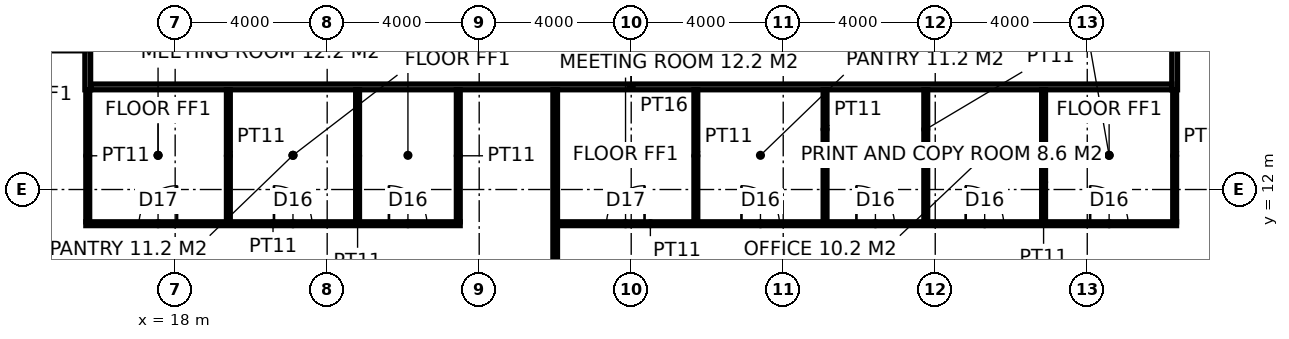
"""IFC4 building model, lengths in metres.
Left out: names, types, materials, properties, quantities, classifications, styles, units other than length and angle.
Written with IfcOpenShell. Run it as: python <this file> out.ifc"""

import sys

from ifc_helpers import new_model, si_unit, direction, frame, frame_2d, origin, place, context, subcontext, project, spatial, rectangle, extrude, element, fill, save


model = new_model("IFC4")
c1 = context("Model", 3, precision=1e-05, world=origin(), true_north=direction((0.0, 1.0)))
c2 = subcontext(c1, "Body", "Model", "MODEL_VIEW")
j1 = project(units=[si_unit("LENGTHUNIT", "METRE"), si_unit("PLANEANGLEUNIT", "RADIAN")], contexts=[c1])
p1 = place(None, origin())
s1 = spatial("IfcSite", under=j1, at=p1, CompositionType="ELEMENT")
p2 = place(p1, origin())
s2 = spatial("IfcBuilding", under=s1, at=p2, CompositionType="ELEMENT")
p3 = place(p2, frame((0.0, 0.0, 67.0)))
s3 = spatial("IfcBuildingStorey", under=s2, at=p3, CompositionType="ELEMENT", Elevation=67.0)
p4 = place(p3, frame((15.7, 14.625, 0.0), z_axis=(0.0, 0.0, 1.0), x_axis=(0.0, 1.0, 0.0)))
e1 = element("IfcWall", 1, at=p4, inside=s3, PredefinedType="PARTITIONING", context=c2, shape_type="SweptSolid", body=[
    extrude(rectangle(XDim=24.15, YDim=0.15, at=frame_2d((12.075, 0.0))), origin(), (0.0, 0.0, 1.0), 3.85),
])
p5 = place(p4, frame((7.475, 0.0, 0.0)))
e2 = element("IfcOpeningElement", 2, at=p5, cuts=e1, PredefinedType="OPENING", context=c2, shape_type="SweptSolid", body=[
    extrude(rectangle(XDim=1.8, YDim=2.4, at=frame_2d((0.9, 1.2))), frame((0.0, 0.085, 0.0), z_axis=(0.0, -1.0, 0.0), x_axis=(1.0, 0.0, 0.0)), (0.0, 0.0, 1.0), 0.17),
])
p6 = place(p4, frame((19.425, 0.0, 0.0)))
e3 = element("IfcOpeningElement", 3, at=p6, cuts=e1, PredefinedType="OPENING", context=c2, shape_type="SweptSolid", body=[
    extrude(rectangle(XDim=1.8, YDim=2.4, at=frame_2d((0.9, 1.2))), frame((0.0, 0.085, 0.0), z_axis=(0.0, -1.0, 0.0), x_axis=(1.0, 0.0, 0.0)), (0.0, 0.0, 1.0), 0.17),
])
p7 = place(p3, frame((44.3, 14.625, 0.0), z_axis=(0.0, 0.0, 1.0), x_axis=(0.0, 1.0, 0.0)))
e4 = element("IfcWall", 4, at=p7, inside=s3, PredefinedType="PARTITIONING", context=c2, shape_type="SweptSolid", body=[
    extrude(rectangle(XDim=24.15, YDim=0.15, at=frame_2d((12.075, 0.0))), origin(), (0.0, 0.0, 1.0), 3.85),
])
p8 = place(p7, frame((2.825, 0.0, 0.0)))
e5 = element("IfcOpeningElement", 5, at=p8, cuts=e4, PredefinedType="OPENING", context=c2, shape_type="SweptSolid", body=[
    extrude(rectangle(XDim=1.8, YDim=2.4, at=frame_2d((0.9, 1.2))), frame((0.0, 0.085, 0.0), z_axis=(0.0, -1.0, 0.0), x_axis=(1.0, 0.0, 0.0)), (0.0, 0.0, 1.0), 0.17),
])
p9 = place(p7, frame((15.425, 0.0, 0.0)))
e6 = element("IfcOpeningElement", 6, at=p9, cuts=e4, PredefinedType="OPENING", context=c2, shape_type="SweptSolid", body=[
    extrude(rectangle(XDim=1.8, YDim=2.4, at=frame_2d((0.9, 1.2))), frame((0.0, 0.085, 0.0), z_axis=(0.0, -1.0, 0.0), x_axis=(1.0, 0.0, 0.0)), (0.0, 0.0, 1.0), 0.17),
])
p10 = place(p3, frame((15.775, 14.7, 0.0), z_axis=(0.0, 0.0, 1.0), x_axis=(1.0, 0.0, 0.0)))
e7 = element("IfcWall", 7, at=p10, inside=s3, PredefinedType="PARTITIONING", context=c2, shape_type="SweptSolid", body=[
    extrude(rectangle(XDim=28.45, YDim=0.15, at=frame_2d((14.225, 0.0))), origin(), (0.0, 0.0, 1.0), 3.85),
])
p11 = place(p3, frame((28.0, 0.3, 0.0), z_axis=(0.0, 0.0, 1.0), x_axis=(0.0, 1.0, 0.0)))
e8 = element("IfcWall", 8, at=p11, inside=s3, PredefinedType="PARTITIONING", context=c2, shape_type="SweptSolid", body=[
    extrude(rectangle(XDim=14.325, YDim=0.12, at=frame_2d((7.163, 0.0))), origin(), (0.0, 0.0, 1.0), 3.85),
])
p12 = place(p3, frame((15.65, 11.1, 0.0), z_axis=(0.0, 0.0, 1.0), x_axis=(1.0, 0.0, 0.0)))
e9 = element("IfcWall", 9, at=p12, inside=s3, PredefinedType="PARTITIONING", context=c2, shape_type="SweptSolid", body=[
    extrude(rectangle(XDim=9.85, YDim=0.1, at=frame_2d((4.925, 0.0))), origin(), (0.0, 0.0, 1.0), 3.85),
])
p13 = place(p12, frame((1.4, 0.0, 0.0)))
e10 = element("IfcOpeningElement", 10, at=p13, cuts=e9, PredefinedType="OPENING", context=c2, shape_type="SweptSolid", body=[
    extrude(rectangle(XDim=1.0, YDim=2.2, at=frame_2d((0.5, 1.1))), frame((0.0, 0.06, 0.0), z_axis=(0.0, -1.0, 0.0), x_axis=(1.0, 0.0, 0.0)), (0.0, 0.0, 1.0), 0.12),
])
p14 = place(p12, frame((4.95, 0.0, 0.0)))
e11 = element("IfcOpeningElement", 11, at=p14, cuts=e9, PredefinedType="OPENING", context=c2, shape_type="SweptSolid", body=[
    extrude(rectangle(XDim=1.0, YDim=2.2, at=frame_2d((0.5, 1.1))), frame((0.0, 0.06, 0.0), z_axis=(0.0, -1.0, 0.0), x_axis=(1.0, 0.0, 0.0)), (0.0, 0.0, 1.0), 0.12),
])
p15 = place(p12, frame((7.975, 0.0, 0.0)))
e12 = element("IfcOpeningElement", 12, at=p15, cuts=e9, PredefinedType="OPENING", context=c2, shape_type="SweptSolid", body=[
    extrude(rectangle(XDim=1.0, YDim=2.2, at=frame_2d((0.5, 1.1))), frame((0.0, 0.06, 0.0), z_axis=(0.0, -1.0, 0.0), x_axis=(1.0, 0.0, 0.0)), (0.0, 0.0, 1.0), 0.12),
])
p16 = place(p3, frame((28.061, 11.1, 0.0), z_axis=(0.0, 0.0, 1.0), x_axis=(1.0, 0.0, 0.0)))
e13 = element("IfcWall", 13, at=p16, inside=s3, PredefinedType="PARTITIONING", context=c2, shape_type="SweptSolid", body=[
    extrude(rectangle(XDim=16.289, YDim=0.1, at=frame_2d((8.145, 0.0))), origin(), (0.0, 0.0, 1.0), 3.85),
])
p17 = place(p16, frame((1.29, 0.0, 0.0)))
e14 = element("IfcOpeningElement", 14, at=p17, cuts=e13, PredefinedType="OPENING", context=c2, shape_type="SweptSolid", body=[
    extrude(rectangle(XDim=1.0, YDim=2.2, at=frame_2d((0.5, 1.1))), frame((0.0, 0.06, 0.0), z_axis=(0.0, -1.0, 0.0), x_axis=(1.0, 0.0, 0.0)), (0.0, 0.0, 1.0), 0.12),
])
p18 = place(p16, frame((4.84, 0.0, 0.0)))
e15 = element("IfcOpeningElement", 15, at=p18, cuts=e13, PredefinedType="OPENING", context=c2, shape_type="SweptSolid", body=[
    extrude(rectangle(XDim=1.0, YDim=2.2, at=frame_2d((0.5, 1.1))), frame((0.0, 0.06, 0.0), z_axis=(0.0, -1.0, 0.0), x_axis=(1.0, 0.0, 0.0)), (0.0, 0.0, 1.0), 0.12),
])
p19 = place(p16, frame((7.865, 0.0, 0.0)))
e16 = element("IfcOpeningElement", 16, at=p19, cuts=e13, PredefinedType="OPENING", context=c2, shape_type="SweptSolid", body=[
    extrude(rectangle(XDim=1.0, YDim=2.2, at=frame_2d((0.5, 1.1))), frame((0.0, 0.06, 0.0), z_axis=(0.0, -1.0, 0.0), x_axis=(1.0, 0.0, 0.0)), (0.0, 0.0, 1.0), 0.12),
])
p20 = place(p16, frame((10.74, 0.0, 0.0)))
e17 = element("IfcOpeningElement", 17, at=p20, cuts=e13, PredefinedType="OPENING", context=c2, shape_type="SweptSolid", body=[
    extrude(rectangle(XDim=1.0, YDim=2.2, at=frame_2d((0.5, 1.1))), frame((0.0, 0.06, 0.0), z_axis=(0.0, -1.0, 0.0), x_axis=(1.0, 0.0, 0.0)), (0.0, 0.0, 1.0), 0.12),
])
p21 = place(p16, frame((14.014, 0.0, 0.0)))
e18 = element("IfcOpeningElement", 18, at=p21, cuts=e13, PredefinedType="OPENING", context=c2, shape_type="SweptSolid", body=[
    extrude(rectangle(XDim=1.0, YDim=2.2, at=frame_2d((0.5, 1.1))), frame((0.0, 0.06, 0.0), z_axis=(0.0, -1.0, 0.0), x_axis=(1.0, 0.0, 0.0)), (0.0, 0.0, 1.0), 0.12),
])
for number, where, z_axis, x_axis in (
    (19, (15.7, 11.15, 0.0), (0.0, 0.0, 1.0), (0.0, 1.0, 0.0)),
    (20, (19.4, 11.15, 0.0), (0.0, 0.0, 1.0), (0.0, 1.0, 0.0)),
    (21, (22.8, 11.15, 0.0), (0.0, 0.0, 1.0), (0.0, 1.0, 0.0)),
):
    element("IfcWall", number, at=place(p3, frame(where, z_axis=z_axis, x_axis=x_axis)), inside=s3, PredefinedType="PARTITIONING", context=c2, shape_type="SweptSolid", body=[
        extrude(rectangle(XDim=3.475, YDim=0.1, at=frame_2d((1.738, 0.0))), origin(), (0.0, 0.0, 1.0), 3.85),
    ])
p22 = place(p3, frame((25.45, 11.15, 0.0), z_axis=(0.0, 0.0, 1.0), x_axis=(0.0, 1.0, 0.0)))
e22 = element("IfcWall", 22, at=p22, inside=s3, PredefinedType="PARTITIONING", context=c2, shape_type="SweptSolid", body=[
    extrude(rectangle(XDim=3.475, YDim=0.1, at=frame_2d((1.738, 0.0))), origin(), (0.0, 0.0, 1.0), 2.65),
])
for number, where, z_axis, x_axis in (
    (23, (31.701, 11.15, 0.0), (0.0, 0.0, 1.0), (0.0, 1.0, 0.0)),
    (24, (35.101, 11.15, 0.0), (0.0, 0.0, 1.0), (0.0, 1.0, 0.0)),
    (25, (37.751, 11.15, 0.0), (0.0, 0.0, 1.0), (0.0, 1.0, 0.0)),
    (26, (40.851, 11.15, 0.0), (0.0, 0.0, 1.0), (0.0, 1.0, 0.0)),
    (27, (44.3, 11.15, 0.0), (0.0, 0.0, 1.0), (0.0, 1.0, 0.0)),
):
    element("IfcWall", number, at=place(p3, frame(where, z_axis=z_axis, x_axis=x_axis)), inside=s3, PredefinedType="PARTITIONING", context=c2, shape_type="SweptSolid", body=[
        extrude(rectangle(XDim=3.475, YDim=0.1, at=frame_2d((1.738, 0.0))), origin(), (0.0, 0.0, 1.0), 3.85),
    ])
p23 = place(p13, origin())
e28 = element("IfcDoor", 28, at=p23, inside=s3, OperationType="SINGLE_SWING_RIGHT", PredefinedType="DOOR", context=c2, shape_type="SweptSolid", body=[
    extrude(rectangle(XDim=1.0, YDim=2.2, at=frame_2d((0.5, 1.1))), frame((0.0, 0.025, 0.0), z_axis=(0.0, -1.0, 0.0), x_axis=(1.0, 0.0, 0.0)), (0.0, 0.0, 1.0), 0.05),
])
fill(e10, e28)
p24 = place(p14, origin())
e29 = element("IfcDoor", 29, at=p24, inside=s3, OperationType="SINGLE_SWING_LEFT", PredefinedType="DOOR", context=c2, shape_type="SweptSolid", body=[
    extrude(rectangle(XDim=1.0, YDim=2.2, at=frame_2d((0.5, 1.1))), frame((0.0, 0.025, 0.0), z_axis=(0.0, -1.0, 0.0), x_axis=(1.0, 0.0, 0.0)), (0.0, 0.0, 1.0), 0.05),
])
fill(e11, e29)
p25 = place(p15, origin())
e30 = element("IfcDoor", 30, at=p25, inside=s3, OperationType="SINGLE_SWING_LEFT", PredefinedType="DOOR", context=c2, shape_type="SweptSolid", body=[
    extrude(rectangle(XDim=1.0, YDim=2.2, at=frame_2d((0.5, 1.1))), frame((0.0, 0.025, 0.0), z_axis=(0.0, -1.0, 0.0), x_axis=(1.0, 0.0, 0.0)), (0.0, 0.0, 1.0), 0.05),
])
fill(e12, e30)
p26 = place(p17, origin())
e31 = element("IfcDoor", 31, at=p26, inside=s3, OperationType="SINGLE_SWING_RIGHT", PredefinedType="DOOR", context=c2, shape_type="SweptSolid", body=[
    extrude(rectangle(XDim=1.0, YDim=2.2, at=frame_2d((0.5, 1.1))), frame((0.0, 0.025, 0.0), z_axis=(0.0, -1.0, 0.0), x_axis=(1.0, 0.0, 0.0)), (0.0, 0.0, 1.0), 0.05),
])
fill(e14, e31)
p27 = place(p18, origin())
e32 = element("IfcDoor", 32, at=p27, inside=s3, OperationType="SINGLE_SWING_LEFT", PredefinedType="DOOR", context=c2, shape_type="SweptSolid", body=[
    extrude(rectangle(XDim=1.0, YDim=2.2, at=frame_2d((0.5, 1.1))), frame((0.0, 0.025, 0.0), z_axis=(0.0, -1.0, 0.0), x_axis=(1.0, 0.0, 0.0)), (0.0, 0.0, 1.0), 0.05),
])
fill(e15, e32)
p28 = place(p19, origin())
e33 = element("IfcDoor", 33, at=p28, inside=s3, OperationType="SINGLE_SWING_LEFT", PredefinedType="DOOR", context=c2, shape_type="SweptSolid", body=[
    extrude(rectangle(XDim=1.0, YDim=2.2, at=frame_2d((0.5, 1.1))), frame((0.0, 0.025, 0.0), z_axis=(0.0, -1.0, 0.0), x_axis=(1.0, 0.0, 0.0)), (0.0, 0.0, 1.0), 0.05),
])
fill(e16, e33)
p29 = place(p20, origin())
e34 = element("IfcDoor", 34, at=p29, inside=s3, OperationType="SINGLE_SWING_LEFT", PredefinedType="DOOR", context=c2, shape_type="SweptSolid", body=[
    extrude(rectangle(XDim=1.0, YDim=2.2, at=frame_2d((0.5, 1.1))), frame((0.0, 0.025, 0.0), z_axis=(0.0, -1.0, 0.0), x_axis=(1.0, 0.0, 0.0)), (0.0, 0.0, 1.0), 0.05),
])
fill(e17, e34)
p30 = place(p21, origin())
e35 = element("IfcDoor", 35, at=p30, inside=s3, OperationType="SINGLE_SWING_LEFT", PredefinedType="DOOR", context=c2, shape_type="SweptSolid", body=[
    extrude(rectangle(XDim=1.0, YDim=2.2, at=frame_2d((0.5, 1.1))), frame((0.0, 0.025, 0.0), z_axis=(0.0, -1.0, 0.0), x_axis=(1.0, 0.0, 0.0)), (0.0, 0.0, 1.0), 0.05),
])
fill(e18, e35)
save(model, sys.argv[1])
